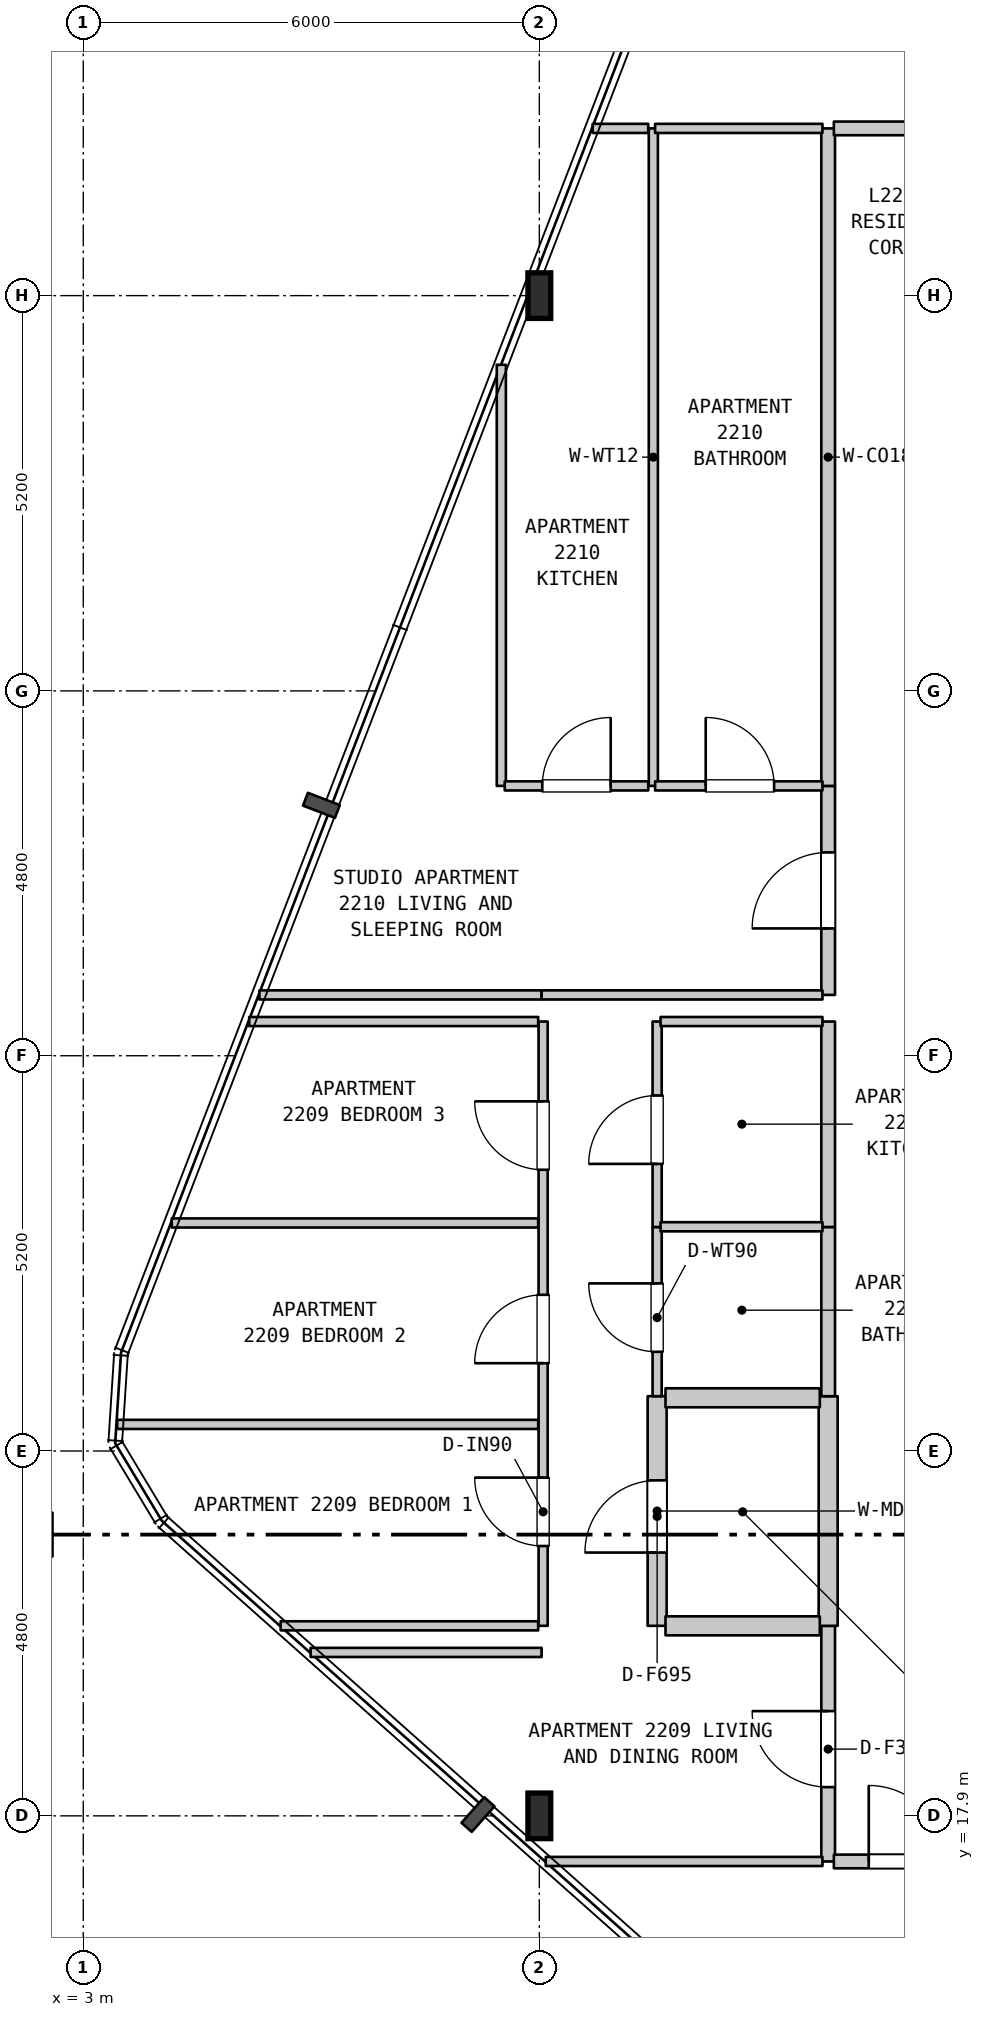
"""IFC4 building model, lengths in metres.
Left out: names, types, materials, properties, quantities, classifications, styles, units other than length and angle.
Written with IfcOpenShell. Run it as: python <this file> out.ifc"""

import sys

from ifc_helpers import new_model, si_unit, direction, frame, frame_2d, origin, origin_2d, place, context, subcontext, project, spatial, rectangle, i_section, extrude, element, fill, save


model = new_model("IFC4")
c1 = context("Model", 3, precision=1e-05, world=origin(), true_north=direction((0.0, 1.0)))
c2 = subcontext(c1, "Body", "Model", "MODEL_VIEW")
j1 = project(units=[si_unit("LENGTHUNIT", "METRE"), si_unit("PLANEANGLEUNIT", "RADIAN")], contexts=[c1])
p1 = place(None, origin())
s1 = spatial("IfcSite", under=j1, at=p1, CompositionType="ELEMENT")
p2 = place(p1, origin())
s2 = spatial("IfcBuilding", under=s1, at=p2, CompositionType="ELEMENT")
p3 = place(p2, frame((0.0, 0.0, 94.6)))
s3 = spatial("IfcBuildingStorey", under=s2, at=p3, CompositionType="ELEMENT", Elevation=94.6)
for number, where, z_axis, x_axis in (
    (1, (9.0, 17.9, 0.0), (0.0, 0.0, 1.0), (1.0, 0.0, 0.0)),
    (2, (9.0, 37.9, 0.0), (0.0, 0.0, 1.0), (1.0, 0.0, 0.0)),
):
    element("IfcColumn", number, at=place(p3, frame(where, z_axis=z_axis, x_axis=x_axis)), inside=s3, PredefinedType="COLUMN", context=c2, shape_type="SweptSolid", body=[
        extrude(i_section(OverallWidth=0.3, OverallDepth=0.6, WebThickness=0.015, FlangeThickness=0.03, FilletRadius=0.027, at=origin_2d()), origin(), (0.0, 0.0, 1.0), 3.7),
    ])
p4 = place(p3, frame((8.5, 31.45, 0.0), z_axis=(0.0, 0.0, 1.0), x_axis=(0.0, 1.0, 0.0)))
e3 = element("IfcWall", 3, at=p4, inside=s3, PredefinedType="PARTITIONING", context=c2, shape_type="SweptSolid", body=[
    extrude(rectangle(XDim=5.54, YDim=0.12, at=frame_2d((2.77, 0.0))), origin(), (0.0, 0.0, 1.0), 3.385),
])
p5 = place(p3, frame((9.05, 20.4, 0.0), z_axis=(0.0, 0.0, 1.0), x_axis=(0.0, 1.0, 0.0)))
e4 = element("IfcWall", 4, at=p5, inside=s3, PredefinedType="PARTITIONING", context=c2, shape_type="SweptSolid", body=[
    extrude(rectangle(XDim=7.95, YDim=0.12, at=frame_2d((3.975, 0.0))), origin(), (0.0, 0.0, 1.0), 2.785),
])
p6 = place(p5, frame((1.05, 0.0, 0.0)))
e5 = element("IfcOpeningElement", 5, at=p6, cuts=e4, PredefinedType="OPENING", context=c2, shape_type="SweptSolid", body=[
    extrude(rectangle(XDim=0.9, YDim=2.15, at=frame_2d((0.45, 1.075))), frame((0.0, 0.07, 0.0), z_axis=(0.0, -1.0, 0.0), x_axis=(1.0, 0.0, 0.0)), (0.0, 0.0, 1.0), 0.14),
])
p7 = place(p5, frame((3.455, 0.0, 0.0)))
e6 = element("IfcOpeningElement", 6, at=p7, cuts=e4, PredefinedType="OPENING", context=c2, shape_type="SweptSolid", body=[
    extrude(rectangle(XDim=0.9, YDim=2.15, at=frame_2d((0.45, 1.075))), frame((0.0, 0.07, 0.0), z_axis=(0.0, -1.0, 0.0), x_axis=(1.0, 0.0, 0.0)), (0.0, 0.0, 1.0), 0.14),
])
p8 = place(p5, frame((6.0, 0.0, 0.0)))
e7 = element("IfcOpeningElement", 7, at=p8, cuts=e4, PredefinedType="OPENING", context=c2, shape_type="SweptSolid", body=[
    extrude(rectangle(XDim=0.9, YDim=2.15, at=frame_2d((0.45, 1.075))), frame((0.0, 0.07, 0.0), z_axis=(0.0, -1.0, 0.0), x_axis=(1.0, 0.0, 0.0)), (0.0, 0.0, 1.0), 0.14),
])
p9 = place(p3, frame((10.5, 31.45, 0.0), z_axis=(0.0, 0.0, 1.0), x_axis=(0.0, 1.0, 0.0)))
e8 = element("IfcWall", 8, at=p9, inside=s3, PredefinedType="PARTITIONING", context=c2, shape_type="SweptSolid", body=[
    extrude(rectangle(XDim=8.65, YDim=0.12, at=frame_2d((4.325, 0.0))), origin(), (0.0, 0.0, 1.0), 3.385),
])
p10 = place(p3, frame((10.55, 20.4, 0.0), z_axis=(0.0, 0.0, 1.0), x_axis=(0.0, 1.0, 0.0)))
e9 = element("IfcWall", 9, at=p10, inside=s3, PredefinedType="STANDARD", context=c2, shape_type="SweptSolid", body=[
    extrude(rectangle(XDim=3.021, YDim=0.25, at=frame_2d((1.51, 0.0))), origin(), (0.0, 0.0, 1.0), 3.385),
])
p11 = place(p10, frame((0.964, 0.0, 0.0)))
e10 = element("IfcOpeningElement", 10, at=p11, cuts=e9, PredefinedType="OPENING", context=c2, shape_type="SweptSolid", body=[
    extrude(rectangle(XDim=0.95, YDim=2.15, at=frame_2d((0.475, 1.075))), frame((0.0, 0.135, 0.0), z_axis=(0.0, -1.0, 0.0), x_axis=(1.0, 0.0, 0.0)), (0.0, 0.0, 1.0), 0.27),
])
p12 = place(p3, frame((10.55, 23.421, 0.0), z_axis=(0.0, 0.0, 1.0), x_axis=(0.0, 1.0, 0.0)))
e11 = element("IfcWall", 11, at=p12, inside=s3, PredefinedType="PARTITIONING", context=c2, shape_type="SweptSolid", body=[
    extrude(rectangle(XDim=2.226, YDim=0.12, at=frame_2d((1.113, 0.0))), origin(), (0.0, 0.0, 1.0), 3.385),
])
p13 = place(p12, frame((0.584, 0.0, 0.0)))
e12 = element("IfcOpeningElement", 12, at=p13, cuts=e11, PredefinedType="OPENING", context=c2, shape_type="SweptSolid", body=[
    extrude(rectangle(XDim=0.9, YDim=2.1, at=frame_2d((0.45, 1.05))), frame((0.0, 0.07, 0.0), z_axis=(0.0, -1.0, 0.0), x_axis=(1.0, 0.0, 0.0)), (0.0, 0.0, 1.0), 0.14),
])
p14 = place(p3, frame((10.55, 25.647, 0.0), z_axis=(0.0, 0.0, 1.0), x_axis=(0.0, 1.0, 0.0)))
e13 = element("IfcWall", 13, at=p14, inside=s3, PredefinedType="PARTITIONING", context=c2, shape_type="SweptSolid", body=[
    extrude(rectangle(XDim=2.703, YDim=0.12, at=frame_2d((1.352, 0.0))), origin(), (0.0, 0.0, 1.0), 3.385),
])
p15 = place(p14, frame((0.83, 0.0, 0.0)))
e14 = element("IfcOpeningElement", 14, at=p15, cuts=e13, PredefinedType="OPENING", context=c2, shape_type="SweptSolid", body=[
    extrude(rectangle(XDim=0.9, YDim=2.15, at=frame_2d((0.45, 1.075))), frame((0.0, 0.07, 0.0), z_axis=(0.0, -1.0, 0.0), x_axis=(1.0, 0.0, 0.0)), (0.0, 0.0, 1.0), 0.14),
])
p16 = place(p3, frame((12.8, 17.3, 0.0), z_axis=(0.0, 0.0, 1.0), x_axis=(0.0, 1.0, 0.0)))
e15 = element("IfcWall", 15, at=p16, inside=s3, PredefinedType="STANDARD", context=c2, shape_type="SweptSolid", body=[
    extrude(rectangle(XDim=3.1, YDim=0.18, at=frame_2d((1.55, 0.0))), origin(), (0.0, 0.0, 1.0), 3.385),
])
p17 = place(p16, frame((0.978, 0.0, 0.0)))
e16 = element("IfcOpeningElement", 16, at=p17, cuts=e15, PredefinedType="OPENING", context=c2, shape_type="SweptSolid", body=[
    extrude(rectangle(XDim=1.0, YDim=2.15, at=frame_2d((0.5, 1.075))), frame((0.0, 0.1, 0.0), z_axis=(0.0, -1.0, 0.0), x_axis=(1.0, 0.0, 0.0)), (0.0, 0.0, 1.0), 0.2),
])
p18 = place(p3, frame((12.8, 20.4, 0.0), z_axis=(0.0, 0.0, 1.0), x_axis=(0.0, 1.0, 0.0)))
e17 = element("IfcWall", 17, at=p18, inside=s3, PredefinedType="STANDARD", context=c2, shape_type="SweptSolid", body=[
    extrude(rectangle(XDim=3.021, YDim=0.25, at=frame_2d((1.51, 0.0))), origin(), (0.0, 0.0, 1.0), 3.385),
])
p19 = place(p3, frame((12.8, 23.421, 0.0), z_axis=(0.0, 0.0, 1.0), x_axis=(0.0, 1.0, 0.0)))
e18 = element("IfcWall", 18, at=p19, inside=s3, PredefinedType="STANDARD", context=c2, shape_type="SweptSolid", body=[
    extrude(rectangle(XDim=2.226, YDim=0.18, at=frame_2d((1.113, 0.0))), origin(), (0.0, 0.0, 1.0), 3.385),
])
p20 = place(p3, frame((12.8, 25.647, 0.0), z_axis=(0.0, 0.0, 1.0), x_axis=(0.0, 1.0, 0.0)))
e19 = element("IfcWall", 19, at=p20, inside=s3, PredefinedType="STANDARD", context=c2, shape_type="SweptSolid", body=[
    extrude(rectangle(XDim=2.703, YDim=0.18, at=frame_2d((1.352, 0.0))), origin(), (0.0, 0.0, 1.0), 3.385),
])
p21 = place(p3, frame((12.8, 28.7, 0.0), z_axis=(0.0, 0.0, 1.0), x_axis=(0.0, 1.0, 0.0)))
e20 = element("IfcWall", 20, at=p21, inside=s3, PredefinedType="STANDARD", context=c2, shape_type="SweptSolid", body=[
    extrude(rectangle(XDim=2.75, YDim=0.18, at=frame_2d((1.375, 0.0))), origin(), (0.0, 0.0, 1.0), 3.385),
])
p22 = place(p21, frame((0.875, 0.0, 0.0)))
e21 = element("IfcOpeningElement", 21, at=p22, cuts=e20, PredefinedType="OPENING", context=c2, shape_type="SweptSolid", body=[
    extrude(rectangle(XDim=1.0, YDim=2.15, at=frame_2d((0.5, 1.075))), frame((0.0, 0.1, 0.0), z_axis=(0.0, -1.0, 0.0), x_axis=(1.0, 0.0, 0.0)), (0.0, 0.0, 1.0), 0.2),
])
p23 = place(p3, frame((12.8, 31.45, 0.0), z_axis=(0.0, 0.0, 1.0), x_axis=(0.0, 1.0, 0.0)))
e22 = element("IfcWall", 22, at=p23, inside=s3, PredefinedType="STANDARD", context=c2, shape_type="SweptSolid", body=[
    extrude(rectangle(XDim=8.65, YDim=0.18, at=frame_2d((4.325, 0.0))), origin(), (0.0, 0.0, 1.0), 3.385),
])
p24 = place(p3, frame((9.085, 17.3, 0.0), z_axis=(0.0, 0.0, 1.0), x_axis=(1.0, 0.0, 0.0)))
e23 = element("IfcWall", 23, at=p24, inside=s3, PredefinedType="PARTITIONING", context=c2, shape_type="SweptSolid", body=[
    extrude(rectangle(XDim=3.64, YDim=0.12, at=frame_2d((1.82, 0.0))), origin(), (0.0, 0.0, 1.0), 3.385),
])
p25 = place(p3, frame((12.875, 17.3, 0.0), z_axis=(0.0, 0.0, 1.0), x_axis=(1.0, 0.0, 0.0)))
e24 = element("IfcWall", 24, at=p25, inside=s3, PredefinedType="STANDARD", context=c2, shape_type="SweptSolid", body=[
    extrude(rectangle(XDim=3.5, YDim=0.18, at=frame_2d((1.75, 0.0))), origin(), (0.0, 0.0, 1.0), 3.385),
])
p26 = place(p25, frame((0.459, 0.0, 0.0)))
e25 = element("IfcOpeningElement", 25, at=p26, cuts=e24, PredefinedType="OPENING", context=c2, shape_type="SweptSolid", body=[
    extrude(rectangle(XDim=1.0, YDim=2.15, at=frame_2d((0.5, 1.075))), frame((0.0, 0.1, 0.0), z_axis=(0.0, -1.0, 0.0), x_axis=(1.0, 0.0, 0.0)), (0.0, 0.0, 1.0), 0.2),
])
p27 = place(p3, frame((5.991, 20.05, 0.0), z_axis=(0.0, 0.0, 1.0), x_axis=(1.0, 0.0, 0.0)))
e26 = element("IfcWall", 26, at=p27, inside=s3, PredefinedType="PARTITIONING", context=c2, shape_type="SweptSolid", body=[
    extrude(rectangle(XDim=3.039, YDim=0.12, at=frame_2d((1.52, 0.0))), origin(), (0.0, 0.0, 1.0), 3.385),
])
p28 = place(p3, frame((5.597, 20.4, 0.0), z_axis=(0.0, 0.0, 1.0), x_axis=(1.0, 0.0, 0.0)))
e27 = element("IfcWall", 27, at=p28, inside=s3, PredefinedType="PARTITIONING", context=c2, shape_type="SweptSolid", body=[
    extrude(rectangle(XDim=3.388, YDim=0.12, at=frame_2d((1.694, 0.0))), origin(), (0.0, 0.0, 1.0), 3.385),
])
p29 = place(p3, frame((10.66, 20.4, 0.0), z_axis=(0.0, 0.0, 1.0), x_axis=(1.0, 0.0, 0.0)))
e28 = element("IfcWall", 28, at=p29, inside=s3, PredefinedType="STANDARD", context=c2, shape_type="SweptSolid", body=[
    extrude(rectangle(XDim=2.03, YDim=0.25, at=frame_2d((1.015, 0.0))), origin(), (0.0, 0.0, 1.0), 3.385),
])
p30 = place(p3, frame((3.446, 23.05, 0.0), z_axis=(0.0, 0.0, 1.0), x_axis=(1.0, 0.0, 0.0)))
e29 = element("IfcWall", 29, at=p30, inside=s3, PredefinedType="PARTITIONING", context=c2, shape_type="SweptSolid", body=[
    extrude(rectangle(XDim=5.539, YDim=0.12, at=frame_2d((2.77, 0.0))), origin(), (0.0, 0.0, 1.0), 3.385),
])
p31 = place(p3, frame((10.66, 23.4, 0.0), z_axis=(0.0, 0.0, 1.0), x_axis=(1.0, 0.0, 0.0)))
e30 = element("IfcWall", 30, at=p31, inside=s3, PredefinedType="STANDARD", context=c2, shape_type="SweptSolid", body=[
    extrude(rectangle(XDim=2.03, YDim=0.25, at=frame_2d((1.015, 0.0))), origin(), (0.0, 0.0, 1.0), 3.385),
])
p32 = place(p3, frame((10.595, 25.65, 0.0), z_axis=(0.0, 0.0, 1.0), x_axis=(1.0, 0.0, 0.0)))
e31 = element("IfcWall", 31, at=p32, inside=s3, PredefinedType="PARTITIONING", context=c2, shape_type="SweptSolid", body=[
    extrude(rectangle(XDim=2.13, YDim=0.12, at=frame_2d((1.065, 0.0))), origin(), (0.0, 0.0, 1.0), 3.385),
])
p33 = place(p3, frame((4.164, 25.7, 0.0), z_axis=(0.0, 0.0, 1.0), x_axis=(1.0, 0.0, 0.0)))
e32 = element("IfcWall", 32, at=p33, inside=s3, PredefinedType="PARTITIONING", context=c2, shape_type="SweptSolid", body=[
    extrude(rectangle(XDim=4.821, YDim=0.12, at=frame_2d((2.411, 0.0))), origin(), (0.0, 0.0, 1.0), 3.385),
])
p34 = place(p3, frame((5.183, 28.35, 0.0), z_axis=(0.0, 0.0, 1.0), x_axis=(1.0, 0.0, 0.0)))
e33 = element("IfcWall", 33, at=p34, inside=s3, PredefinedType="PARTITIONING", context=c2, shape_type="SweptSolid", body=[
    extrude(rectangle(XDim=3.802, YDim=0.12, at=frame_2d((1.901, 0.0))), origin(), (0.0, 0.0, 1.0), 3.385),
])
p35 = place(p3, frame((10.595, 28.35, 0.0), z_axis=(0.0, 0.0, 1.0), x_axis=(1.0, 0.0, 0.0)))
e34 = element("IfcWall", 34, at=p35, inside=s3, PredefinedType="PARTITIONING", context=c2, shape_type="SweptSolid", body=[
    extrude(rectangle(XDim=2.13, YDim=0.12, at=frame_2d((1.065, 0.0))), origin(), (0.0, 0.0, 1.0), 3.385),
])
p36 = place(p3, frame((5.317, 28.7, 0.0), z_axis=(0.0, 0.0, 1.0), x_axis=(1.0, 0.0, 0.0)))
e35 = element("IfcWall", 35, at=p36, inside=s3, PredefinedType="PARTITIONING", context=c2, shape_type="SweptSolid", body=[
    extrude(rectangle(XDim=3.713, YDim=0.12, at=frame_2d((1.856, 0.0))), origin(), (0.0, 0.0, 1.0), 3.385),
])
p37 = place(p3, frame((9.03, 28.7, 0.0), z_axis=(0.0, 0.0, 1.0), x_axis=(1.0, 0.0, 0.0)))
e36 = element("IfcWall", 36, at=p37, inside=s3, PredefinedType="PARTITIONING", context=c2, shape_type="SweptSolid", body=[
    extrude(rectangle(XDim=3.695, YDim=0.12, at=frame_2d((1.848, 0.0))), origin(), (0.0, 0.0, 1.0), 3.385),
])
p38 = place(p3, frame((8.545, 31.45, 0.0), z_axis=(0.0, 0.0, 1.0), x_axis=(1.0, 0.0, 0.0)))
e37 = element("IfcWall", 37, at=p38, inside=s3, PredefinedType="PARTITIONING", context=c2, shape_type="SweptSolid", body=[
    extrude(rectangle(XDim=1.888, YDim=0.12, at=frame_2d((0.944, 0.0))), origin(), (0.0, 0.0, 1.0), 3.385),
])
p39 = place(p38, frame((0.494, 0.0, 0.0)))
e38 = element("IfcOpeningElement", 38, at=p39, cuts=e37, PredefinedType="OPENING", context=c2, shape_type="SweptSolid", body=[
    extrude(rectangle(XDim=0.9, YDim=2.15, at=frame_2d((0.45, 1.075))), frame((0.0, 0.07, 0.0), z_axis=(0.0, -1.0, 0.0), x_axis=(1.0, 0.0, 0.0)), (0.0, 0.0, 1.0), 0.14),
])
p40 = place(p3, frame((10.523, 31.45, 0.0), z_axis=(0.0, 0.0, 1.0), x_axis=(1.0, 0.0, 0.0)))
e39 = element("IfcWall", 39, at=p40, inside=s3, PredefinedType="PARTITIONING", context=c2, shape_type="SweptSolid", body=[
    extrude(rectangle(XDim=2.202, YDim=0.12, at=frame_2d((1.101, 0.0))), origin(), (0.0, 0.0, 1.0), 3.385),
])
p41 = place(p40, frame((0.666, 0.0, 0.0)))
e40 = element("IfcOpeningElement", 40, at=p41, cuts=e39, PredefinedType="OPENING", context=c2, shape_type="SweptSolid", body=[
    extrude(rectangle(XDim=0.9, YDim=2.1, at=frame_2d((0.45, 1.05))), frame((0.0, 0.07, 0.0), z_axis=(0.0, -1.0, 0.0), x_axis=(1.0, 0.0, 0.0)), (0.0, 0.0, 1.0), 0.14),
])
p42 = place(p3, frame((9.702, 40.1, 0.0), z_axis=(0.0, 0.0, 1.0), x_axis=(1.0, 0.0, 0.0)))
e41 = element("IfcWall", 41, at=p42, inside=s3, PredefinedType="PARTITIONING", context=c2, shape_type="SweptSolid", body=[
    extrude(rectangle(XDim=0.731, YDim=0.12, at=frame_2d((0.366, 0.0))), origin(), (0.0, 0.0, 1.0), 3.385),
])
p43 = place(p3, frame((10.523, 40.1, 0.0), z_axis=(0.0, 0.0, 1.0), x_axis=(1.0, 0.0, 0.0)))
e42 = element("IfcWall", 42, at=p43, inside=s3, PredefinedType="PARTITIONING", context=c2, shape_type="SweptSolid", body=[
    extrude(rectangle(XDim=2.202, YDim=0.12, at=frame_2d((1.101, 0.0))), origin(), (0.0, 0.0, 1.0), 3.385),
])
p44 = place(p3, frame((12.875, 40.1, 0.0), z_axis=(0.0, 0.0, 1.0), x_axis=(1.0, 0.0, 0.0)))
e43 = element("IfcWall", 43, at=p44, inside=s3, PredefinedType="STANDARD", context=c2, shape_type="SweptSolid", body=[
    extrude(rectangle(XDim=5.59, YDim=0.18, at=frame_2d((2.795, 0.0))), origin(), (0.0, 0.0, 1.0), 3.385),
])
p45 = place(p44, frame((2.28, 0.0, 0.0)))
e44 = element("IfcOpeningElement", 44, at=p45, cuts=e43, PredefinedType="OPENING", context=c2, shape_type="SweptSolid", body=[
    extrude(rectangle(XDim=1.0, YDim=2.15, at=frame_2d((0.5, 1.075))), frame((0.0, 0.1, 0.0), z_axis=(0.0, -1.0, 0.0), x_axis=(1.0, 0.0, 0.0)), (0.0, 0.0, 1.0), 0.2),
])
p46 = place(p6, origin())
e45 = element("IfcDoor", 45, at=p46, inside=s3, OperationType="SINGLE_SWING_RIGHT", PredefinedType="DOOR", context=c2, shape_type="SweptSolid", body=[
    extrude(rectangle(XDim=0.9, YDim=2.15, at=frame_2d((0.45, 1.075))), frame((0.0, 0.025, 0.0), z_axis=(0.0, -1.0, 0.0), x_axis=(1.0, 0.0, 0.0)), (0.0, 0.0, 1.0), 0.05),
])
fill(e5, e45)
p47 = place(p7, origin())
e46 = element("IfcDoor", 46, at=p47, inside=s3, OperationType="SINGLE_SWING_LEFT", PredefinedType="DOOR", context=c2, shape_type="SweptSolid", body=[
    extrude(rectangle(XDim=0.9, YDim=2.15, at=frame_2d((0.45, 1.075))), frame((0.0, 0.025, 0.0), z_axis=(0.0, -1.0, 0.0), x_axis=(1.0, 0.0, 0.0)), (0.0, 0.0, 1.0), 0.05),
])
fill(e6, e46)
p48 = place(p8, origin())
e47 = element("IfcDoor", 47, at=p48, inside=s3, OperationType="SINGLE_SWING_RIGHT", PredefinedType="DOOR", context=c2, shape_type="SweptSolid", body=[
    extrude(rectangle(XDim=0.9, YDim=2.15, at=frame_2d((0.45, 1.075))), frame((0.0, 0.025, 0.0), z_axis=(0.0, -1.0, 0.0), x_axis=(1.0, 0.0, 0.0)), (0.0, 0.0, 1.0), 0.05),
])
fill(e7, e47)
p49 = place(p11, origin())
e48 = element("IfcDoor", 48, at=p49, inside=s3, OperationType="SINGLE_SWING_LEFT", PredefinedType="DOOR", context=c2, shape_type="SweptSolid", body=[
    extrude(rectangle(XDim=0.95, YDim=2.15, at=frame_2d((0.475, 1.075))), frame((0.0, 0.025, 0.0), z_axis=(0.0, -1.0, 0.0), x_axis=(1.0, 0.0, 0.0)), (0.0, 0.0, 1.0), 0.05),
])
fill(e10, e48)
p50 = place(p13, origin())
e49 = element("IfcDoor", 49, at=p50, inside=s3, OperationType="SINGLE_SWING_RIGHT", PredefinedType="DOOR", context=c2, shape_type="SweptSolid", body=[
    extrude(rectangle(XDim=0.9, YDim=2.1, at=frame_2d((0.45, 1.05))), frame((0.0, 0.025, 0.0), z_axis=(0.0, -1.0, 0.0), x_axis=(1.0, 0.0, 0.0)), (0.0, 0.0, 1.0), 0.05),
])
fill(e12, e49)
p51 = place(p15, origin())
e50 = element("IfcDoor", 50, at=p51, inside=s3, OperationType="SINGLE_SWING_LEFT", PredefinedType="DOOR", context=c2, shape_type="SweptSolid", body=[
    extrude(rectangle(XDim=0.9, YDim=2.15, at=frame_2d((0.45, 1.075))), frame((0.0, 0.025, 0.0), z_axis=(0.0, -1.0, 0.0), x_axis=(1.0, 0.0, 0.0)), (0.0, 0.0, 1.0), 0.05),
])
fill(e14, e50)
p52 = place(p17, origin())
e51 = element("IfcDoor", 51, at=p52, inside=s3, OperationType="SINGLE_SWING_RIGHT", PredefinedType="DOOR", context=c2, shape_type="SweptSolid", body=[
    extrude(rectangle(XDim=1.0, YDim=2.15, at=frame_2d((0.5, 1.075))), frame((0.0, 0.025, 0.0), z_axis=(0.0, -1.0, 0.0), x_axis=(1.0, 0.0, 0.0)), (0.0, 0.0, 1.0), 0.05),
])
fill(e16, e51)
p53 = place(p22, origin())
e52 = element("IfcDoor", 52, at=p53, inside=s3, OperationType="SINGLE_SWING_LEFT", PredefinedType="DOOR", context=c2, shape_type="SweptSolid", body=[
    extrude(rectangle(XDim=1.0, YDim=2.15, at=frame_2d((0.5, 1.075))), frame((0.0, 0.025, 0.0), z_axis=(0.0, -1.0, 0.0), x_axis=(1.0, 0.0, 0.0)), (0.0, 0.0, 1.0), 0.05),
])
fill(e21, e52)
p54 = place(p26, origin())
e53 = element("IfcDoor", 53, at=p54, inside=s3, OperationType="SINGLE_SWING_LEFT", PredefinedType="DOOR", context=c2, shape_type="SweptSolid", body=[
    extrude(rectangle(XDim=1.0, YDim=2.15, at=frame_2d((0.5, 1.075))), frame((0.0, 0.025, 0.0), z_axis=(0.0, -1.0, 0.0), x_axis=(1.0, 0.0, 0.0)), (0.0, 0.0, 1.0), 0.05),
])
fill(e25, e53)
p55 = place(p39, origin())
e54 = element("IfcDoor", 54, at=p55, inside=s3, OperationType="SINGLE_SWING_RIGHT", PredefinedType="DOOR", context=c2, shape_type="SweptSolid", body=[
    extrude(rectangle(XDim=0.9, YDim=2.15, at=frame_2d((0.45, 1.075))), frame((0.0, 0.025, 0.0), z_axis=(0.0, -1.0, 0.0), x_axis=(1.0, 0.0, 0.0)), (0.0, 0.0, 1.0), 0.05),
])
fill(e38, e54)
p56 = place(p41, origin())
e55 = element("IfcDoor", 55, at=p56, inside=s3, OperationType="SINGLE_SWING_LEFT", PredefinedType="DOOR", context=c2, shape_type="SweptSolid", body=[
    extrude(rectangle(XDim=0.9, YDim=2.1, at=frame_2d((0.45, 1.05))), frame((0.0, 0.025, 0.0), z_axis=(0.0, -1.0, 0.0), x_axis=(1.0, 0.0, 0.0)), (0.0, 0.0, 1.0), 0.05),
])
fill(e40, e55)
save(model, sys.argv[1])
